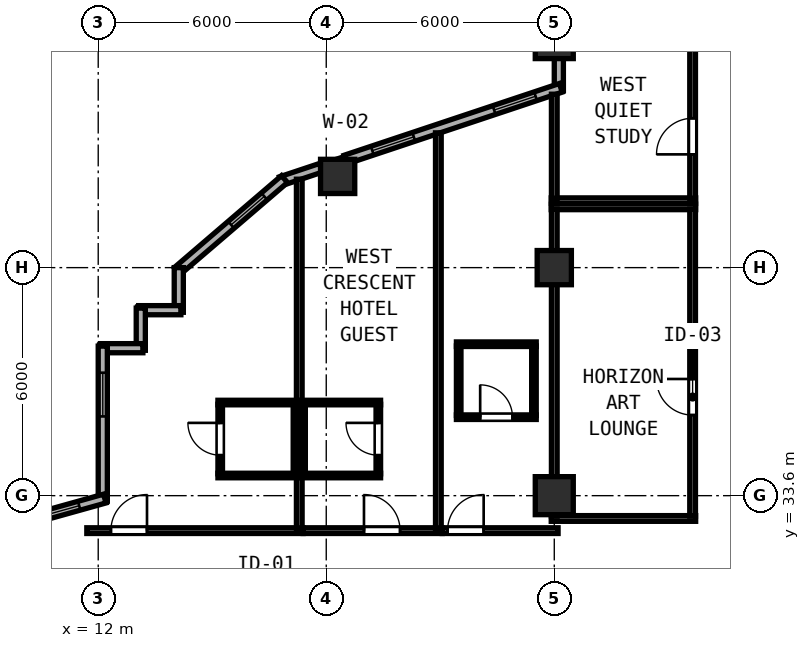
"""IFC4 building model, lengths in metres.
Left out: names, types, materials, properties, quantities, classifications, styles, units other than length and angle.
Written with IfcOpenShell. Run it as: python <this file> out.ifc"""

import sys

from ifc_helpers import new_model, si_unit, direction, frame, frame_2d, origin, origin_2d, place, context, subcontext, project, spatial, rectangle, hollow_rectangle, extrude, element, fill, save


model = new_model("IFC4")
c1 = context("Model", 3, precision=1e-05, world=origin(), true_north=direction((0.0, 1.0)))
c2 = subcontext(c1, "Body", "Model", "MODEL_VIEW")
j1 = project(units=[si_unit("LENGTHUNIT", "METRE"), si_unit("PLANEANGLEUNIT", "RADIAN")], contexts=[c1])
p1 = place(None, origin())
s1 = spatial("IfcSite", under=j1, at=p1, CompositionType="ELEMENT")
p2 = place(p1, origin())
s2 = spatial("IfcBuilding", under=s1, at=p2, CompositionType="ELEMENT")
p3 = place(p2, frame((0.0, 0.0, 144.8)))
s3 = spatial("IfcBuildingStorey", under=s2, at=p3, CompositionType="ELEMENT", Elevation=144.8)
for number, where, z_axis, x_axis in (
    (1, (24.0, 33.6, 0.0), (0.0, 0.0, 1.0), (1.0, 0.0, 0.0)),
    (2, (24.0, 45.6, 0.0), (0.0, 0.0, 1.0), (1.0, 0.0, 0.0)),
):
    element("IfcColumn", number, at=place(p3, frame(where, z_axis=z_axis, x_axis=x_axis)), inside=s3, PredefinedType="COLUMN", context=c2, shape_type="SweptSolid", body=[
        extrude(hollow_rectangle(XDim=1.0, YDim=1.0, WallThickness=0.038, at=origin_2d()), origin(), (0.0, 0.0, 1.0), 3.8),
    ])
for number, where, z_axis, x_axis in (
    (3, (24.0, 39.6, 0.0), (0.0, 0.0, 1.0), (1.0, 0.0, 0.0)),
    (4, (18.3, 42.0, 0.0), (0.0, 0.0, 1.0), (1.0, 0.0, 0.0)),
):
    element("IfcColumn", number, at=place(p3, frame(where, z_axis=z_axis, x_axis=x_axis)), inside=s3, PredefinedType="COLUMN", context=c2, shape_type="SweptSolid", body=[
        extrude(hollow_rectangle(XDim=0.9, YDim=0.9, WallThickness=0.034, at=origin_2d()), origin(), (0.0, 0.0, 1.0), 3.8),
    ])
p4 = place(p3, frame((24.12, 45.108, 0.0), z_axis=(0.0, 0.0, 1.0), x_axis=(0.0, -1.0, 0.0)))
e5 = element("IfcWall", 5, at=p4, inside=s3, PredefinedType="SOLIDWALL", context=c2, shape_type="SweptSolid", body=[
    extrude(rectangle(XDim=0.849, YDim=0.24, at=frame_2d((0.425, 0.0))), origin(), (0.0, 0.0, 1.0), 3.145),
])
p5 = place(p3, frame((24.172, 44.331, 0.0), z_axis=(0.0, 0.0, 1.0), x_axis=(-0.948683298051, -0.316227766017, 0.0)))
e6 = element("IfcWall", 6, at=p5, inside=s3, PredefinedType="SOLIDWALL", context=c2, shape_type="SweptSolid", body=[
    extrude(rectangle(XDim=5.973, YDim=0.24, at=frame_2d((2.987, 0.0))), origin(), (0.0, 0.0, 1.0), 3.145),
])
p6 = place(p5, frame((0.7, 0.0, 0.85)))
e7 = element("IfcOpeningElement", 7, at=p6, cuts=e6, PredefinedType="OPENING", context=c2, shape_type="SweptSolid", body=[
    extrude(rectangle(XDim=1.15, YDim=1.8, at=frame_2d((0.575, 0.9))), frame((0.0, 0.13, 0.0), z_axis=(0.0, -1.0, 0.0), x_axis=(1.0, 0.0, 0.0)), (0.0, 0.0, 1.0), 0.26),
])
p7 = place(p5, frame((4.078, 0.0, 0.85)))
e8 = element("IfcOpeningElement", 8, at=p7, cuts=e6, PredefinedType="OPENING", context=c2, shape_type="SweptSolid", body=[
    extrude(rectangle(XDim=1.15, YDim=1.8, at=frame_2d((0.575, 0.9))), frame((0.0, 0.13, 0.0), z_axis=(0.0, -1.0, 0.0), x_axis=(1.0, 0.0, 0.0)), (0.0, 0.0, 1.0), 0.26),
])
p8 = place(p3, frame((17.858, 42.226, 0.0), z_axis=(0.0, 0.0, 1.0), x_axis=(-0.948639166064, -0.316360131194, 0.0)))
e9 = element("IfcWall", 9, at=p8, inside=s3, PredefinedType="SOLIDWALL", context=c2, shape_type="SweptSolid", body=[
    extrude(rectangle(XDim=1.107, YDim=0.24, at=frame_2d((0.553, 0.0))), origin(), (0.0, 0.0, 1.0), 3.6),
])
p9 = place(p3, frame((16.902, 41.929, 0.0), z_axis=(0.0, 0.0, 1.0), x_axis=(-0.759275136126, -0.650769750112, 0.0)))
e10 = element("IfcWall", 10, at=p9, inside=s3, PredefinedType="SOLIDWALL", context=c2, shape_type="SweptSolid", body=[
    extrude(rectangle(XDim=3.719, YDim=0.24, at=frame_2d((1.86, 0.0))), origin(), (0.0, 0.0, 1.0), 3.6),
])
p10 = place(p9, frame((0.7, 0.0, 0.85)))
e11 = element("IfcOpeningElement", 11, at=p10, cuts=e10, PredefinedType="OPENING", context=c2, shape_type="SweptSolid", body=[
    extrude(rectangle(XDim=1.15, YDim=1.8, at=frame_2d((0.575, 0.9))), frame((0.0, 0.13, 0.0), z_axis=(0.0, -1.0, 0.0), x_axis=(1.0, 0.0, 0.0)), (0.0, 0.0, 1.0), 0.26),
])
p11 = place(p3, frame((14.12, 39.6, 0.0), z_axis=(0.0, 0.0, 1.0), x_axis=(0.0, -1.0, 0.0)))
e12 = element("IfcWall", 12, at=p11, inside=s3, PredefinedType="SOLIDWALL", context=c2, shape_type="SweptSolid", body=[
    extrude(rectangle(XDim=1.175, YDim=0.24, at=frame_2d((0.587, 0.0))), origin(), (0.0, 0.0, 1.0), 3.6),
])
p12 = place(p3, frame((14.175, 38.48, 0.0), z_axis=(0.0, 0.0, 1.0), x_axis=(-1.0, 0.0, 0.0)))
e13 = element("IfcWall", 13, at=p12, inside=s3, PredefinedType="SOLIDWALL", context=c2, shape_type="SweptSolid", body=[
    extrude(rectangle(XDim=1.11, YDim=0.24, at=frame_2d((0.555, 0.0))), origin(), (0.0, 0.0, 1.0), 3.6),
])
p13 = place(p3, frame((13.12, 38.535, 0.0), z_axis=(0.0, 0.0, 1.0), x_axis=(0.0, -1.0, 0.0)))
e14 = element("IfcWall", 14, at=p13, inside=s3, PredefinedType="SOLIDWALL", context=c2, shape_type="SweptSolid", body=[
    extrude(rectangle(XDim=1.11, YDim=0.24, at=frame_2d((0.555, 0.0))), origin(), (0.0, 0.0, 1.0), 3.6),
])
p14 = place(p3, frame((13.175, 37.48, 0.0), z_axis=(0.0, 0.0, 1.0), x_axis=(-1.0, 0.0, 0.0)))
e15 = element("IfcWall", 15, at=p14, inside=s3, PredefinedType="SOLIDWALL", context=c2, shape_type="SweptSolid", body=[
    extrude(rectangle(XDim=1.11, YDim=0.24, at=frame_2d((0.555, 0.0))), origin(), (0.0, 0.0, 1.0), 3.6),
])
p15 = place(p3, frame((12.12, 37.535, 0.0), z_axis=(0.0, 0.0, 1.0), x_axis=(0.0, -1.0, 0.0)))
e16 = element("IfcWall", 16, at=p15, inside=s3, PredefinedType="SOLIDWALL", context=c2, shape_type="SweptSolid", body=[
    extrude(rectangle(XDim=4.081, YDim=0.24, at=frame_2d((2.041, 0.0))), origin(), (0.0, 0.0, 1.0), 3.6),
])
p16 = place(p15, frame((0.7, 0.0, 0.85)))
e17 = element("IfcOpeningElement", 17, at=p16, cuts=e16, PredefinedType="OPENING", context=c2, shape_type="SweptSolid", body=[
    extrude(rectangle(XDim=1.15, YDim=1.8, at=frame_2d((0.575, 0.9))), frame((0.0, 0.13, 0.0), z_axis=(0.0, -1.0, 0.0), x_axis=(1.0, 0.0, 0.0)), (0.0, 0.0, 1.0), 0.26),
])
p17 = place(p3, frame((12.173, 33.524, 0.0), z_axis=(0.0, 0.0, 1.0), x_axis=(-0.963197271032, -0.268795493036, 0.0)))
e18 = element("IfcWall", 18, at=p17, inside=s3, PredefinedType="SOLIDWALL", context=c2, shape_type="SweptSolid", body=[
    extrude(rectangle(XDim=9.095, YDim=0.24, at=frame_2d((4.548, 0.0))), origin(), (0.0, 0.0, 1.0), 3.6),
])
p18 = place(p17, frame((0.7, 0.0, 0.85)))
e19 = element("IfcOpeningElement", 19, at=p18, cuts=e18, PredefinedType="OPENING", context=c2, shape_type="SweptSolid", body=[
    extrude(rectangle(XDim=1.15, YDim=1.8, at=frame_2d((0.575, 0.9))), frame((0.0, 0.13, 0.0), z_axis=(0.0, -1.0, 0.0), x_axis=(1.0, 0.0, 0.0)), (0.0, 0.0, 1.0), 0.26),
])
p19 = place(p17, frame((6.1, 0.0, 0.85)))
e20 = element("IfcOpeningElement", 20, at=p19, cuts=e18, PredefinedType="OPENING", context=c2, shape_type="SweptSolid", body=[
    extrude(rectangle(XDim=1.15, YDim=1.8, at=frame_2d((0.575, 0.9))), frame((0.0, 0.13, 0.0), z_axis=(0.0, -1.0, 0.0), x_axis=(1.0, 0.0, 0.0)), (0.0, 0.0, 1.0), 0.26),
])
for number, where, z_axis, x_axis in (
    (21, (23.92, 41.2, 0.0), (0.0, 0.0, 1.0), (1.0, 0.0, 0.0)),
    (22, (23.92, 33.0, 0.0), (0.0, 0.0, 1.0), (1.0, 0.0, 0.0)),
):
    element("IfcWall", number, at=place(p3, frame(where, z_axis=z_axis, x_axis=x_axis)), inside=s3, PredefinedType="PARTITIONING", context=c2, shape_type="SweptSolid", body=[
        extrude(rectangle(XDim=3.8, YDim=0.15, at=frame_2d((1.9, 0.0))), origin(), (0.0, 0.0, 1.0), 3.6),
    ])
p20 = place(p3, frame((24.0, 33.06, 0.0), z_axis=(0.0, 0.0, 1.0), x_axis=(0.0, 1.0, 0.0)))
e23 = element("IfcWall", 23, at=p20, inside=s3, PredefinedType="PARTITIONING", context=c2, shape_type="SweptSolid", body=[
    extrude(rectangle(XDim=8.08, YDim=0.15, at=frame_2d((4.04, 0.0))), origin(), (0.0, 0.0, 1.0), 3.145),
])
p21 = place(p3, frame((27.64, 33.06, 0.0), z_axis=(0.0, 0.0, 1.0), x_axis=(0.0, 1.0, 0.0)))
e24 = element("IfcWall", 24, at=p21, inside=s3, PredefinedType="PARTITIONING", context=c2, shape_type="SweptSolid", body=[
    extrude(rectangle(XDim=8.08, YDim=0.15, at=frame_2d((4.04, 0.0))), origin(), (0.0, 0.0, 1.0), 3.6),
])
p22 = place(p21, frame((3.61, 0.0, 0.0), z_axis=(0.0, 0.0, 1.0), x_axis=(-1.0, 0.0, 0.0)))
e25 = element("IfcOpeningElement", 25, at=p22, cuts=e24, PredefinedType="OPENING", context=c2, shape_type="SweptSolid", body=[
    extrude(rectangle(XDim=0.95, YDim=2.12, at=frame_2d((0.475, 1.06))), frame((0.0, 0.085, 0.0), z_axis=(0.0, -1.0, 0.0), x_axis=(1.0, 0.0, 0.0)), (0.0, 0.0, 1.0), 0.17),
])
p23 = place(p3, frame((23.92, 41.36, 0.0), z_axis=(0.0, 0.0, 1.0), x_axis=(1.0, 0.0, 0.0)))
e26 = element("IfcWall", 26, at=p23, inside=s3, PredefinedType="PARTITIONING", context=c2, shape_type="SweptSolid", body=[
    extrude(rectangle(XDim=3.8, YDim=0.15, at=frame_2d((1.9, 0.0))), origin(), (0.0, 0.0, 1.0), 3.6),
])
p24 = place(p3, frame((24.0, 41.42, 0.0), z_axis=(0.0, 0.0, 1.0), x_axis=(0.0, 1.0, 0.0)))
e27 = element("IfcWall", 27, at=p24, inside=s3, PredefinedType="PARTITIONING", context=c2, shape_type="SweptSolid", body=[
    extrude(rectangle(XDim=2.743, YDim=0.15, at=frame_2d((1.372, 0.0))), origin(), (0.0, 0.0, 1.0), 3.145),
])
p25 = place(p3, frame((27.64, 41.42, 0.0), z_axis=(0.0, 0.0, 1.0), x_axis=(0.0, 1.0, 0.0)))
e28 = element("IfcWall", 28, at=p25, inside=s3, PredefinedType="PARTITIONING", context=c2, shape_type="SweptSolid", body=[
    extrude(rectangle(XDim=4.54, YDim=0.15, at=frame_2d((2.27, 0.0))), origin(), (0.0, 0.0, 1.0), 3.6),
])
p26 = place(p25, frame((2.11, 0.0, 0.0), z_axis=(0.0, 0.0, 1.0), x_axis=(-1.0, 0.0, 0.0)))
e29 = element("IfcOpeningElement", 29, at=p26, cuts=e28, PredefinedType="OPENING", context=c2, shape_type="SweptSolid", body=[
    extrude(rectangle(XDim=0.95, YDim=2.12, at=frame_2d((0.475, 1.06))), frame((0.0, 0.085, 0.0), z_axis=(0.0, -1.0, 0.0), x_axis=(1.0, 0.0, 0.0)), (0.0, 0.0, 1.0), 0.17),
])
p27 = place(p3, frame((11.7, 32.68, 0.0), z_axis=(0.0, 0.0, 1.0), x_axis=(1.0, 0.0, 0.0)))
e30 = element("IfcWall", 30, at=p27, inside=s3, PredefinedType="PARTITIONING", context=c2, shape_type="SweptSolid", body=[
    extrude(rectangle(XDim=5.69, YDim=0.15, at=frame_2d((2.845, 0.0))), origin(), (0.0, 0.0, 1.0), 3.6),
])
p28 = place(p27, frame((0.634, 0.0, 0.0)))
e31 = element("IfcOpeningElement", 31, at=p28, cuts=e30, PredefinedType="OPENING", context=c2, shape_type="SweptSolid", body=[
    extrude(rectangle(XDim=0.95, YDim=2.15, at=frame_2d((0.475, 1.075))), frame((0.0, 0.085, 0.0), z_axis=(0.0, -1.0, 0.0), x_axis=(1.0, 0.0, 0.0)), (0.0, 0.0, 1.0), 0.17),
])
p29 = place(p3, frame((17.29, 32.74, 0.0), z_axis=(0.0, 0.0, 1.0), x_axis=(0.0, 1.0, 0.0)))
e32 = element("IfcWall", 32, at=p29, inside=s3, PredefinedType="PARTITIONING", context=c2, shape_type="SweptSolid", body=[
    extrude(rectangle(XDim=9.186, YDim=0.15, at=frame_2d((4.593, 0.0))), origin(), (0.0, 0.0, 1.0), 3.6),
])
for number, where, z_axis, x_axis in (
    (33, (15.15, 36.05, 0.0), (0.0, 0.0, 1.0), (1.0, 0.0, 0.0)),
    (34, (15.15, 34.13, 0.0), (0.0, 0.0, 1.0), (1.0, 0.0, 0.0)),
):
    element("IfcWall", number, at=place(p3, frame(where, z_axis=z_axis, x_axis=x_axis)), inside=s3, PredefinedType="PARTITIONING", context=c2, shape_type="SweptSolid", body=[
        extrude(rectangle(XDim=2.08, YDim=0.12, at=frame_2d((1.04, 0.0))), origin(), (0.0, 0.0, 1.0), 3.6),
    ])
p30 = place(p3, frame((15.21, 34.175, 0.0), z_axis=(0.0, 0.0, 1.0), x_axis=(0.0, 1.0, 0.0)))
e35 = element("IfcWall", 35, at=p30, inside=s3, PredefinedType="PARTITIONING", context=c2, shape_type="SweptSolid", body=[
    extrude(rectangle(XDim=1.83, YDim=0.12, at=frame_2d((0.915, 0.0))), origin(), (0.0, 0.0, 1.0), 3.6),
])
p31 = place(p30, frame((1.34, 0.0, 0.0), z_axis=(0.0, 0.0, 1.0), x_axis=(-1.0, 0.0, 0.0)))
e36 = element("IfcOpeningElement", 36, at=p31, cuts=e35, PredefinedType="OPENING", context=c2, shape_type="SweptSolid", body=[
    extrude(rectangle(XDim=0.85, YDim=2.1, at=frame_2d((0.425, 1.05))), frame((0.0, 0.07, 0.0), z_axis=(0.0, -1.0, 0.0), x_axis=(1.0, 0.0, 0.0)), (0.0, 0.0, 1.0), 0.14),
])
p32 = place(p3, frame((17.19, 34.175, 0.0), z_axis=(0.0, 0.0, 1.0), x_axis=(0.0, 1.0, 0.0)))
e37 = element("IfcWall", 37, at=p32, inside=s3, PredefinedType="PARTITIONING", context=c2, shape_type="SweptSolid", body=[
    extrude(rectangle(XDim=1.83, YDim=0.12, at=frame_2d((0.915, 0.0))), origin(), (0.0, 0.0, 1.0), 3.6),
])
p33 = place(p3, frame((17.392, 32.68, 0.0), z_axis=(0.0, 0.0, 1.0), x_axis=(1.0, 0.0, 0.0)))
e38 = element("IfcWall", 38, at=p33, inside=s3, PredefinedType="PARTITIONING", context=c2, shape_type="SweptSolid", body=[
    extrude(rectangle(XDim=3.658, YDim=0.15, at=frame_2d((1.829, 0.0))), origin(), (0.0, 0.0, 1.0), 3.6),
])
p34 = place(p33, frame((1.601, 0.0, 0.0)))
e39 = element("IfcOpeningElement", 39, at=p34, cuts=e38, PredefinedType="OPENING", context=c2, shape_type="SweptSolid", body=[
    extrude(rectangle(XDim=0.95, YDim=2.15, at=frame_2d((0.475, 1.075))), frame((0.0, 0.085, 0.0), z_axis=(0.0, -1.0, 0.0), x_axis=(1.0, 0.0, 0.0)), (0.0, 0.0, 1.0), 0.17),
])
p35 = place(p3, frame((20.95, 32.74, 0.0), z_axis=(0.0, 0.0, 1.0), x_axis=(0.0, 1.0, 0.0)))
e40 = element("IfcWall", 40, at=p35, inside=s3, PredefinedType="PARTITIONING", context=c2, shape_type="SweptSolid", body=[
    extrude(rectangle(XDim=10.406, YDim=0.15, at=frame_2d((5.203, 0.0))), origin(), (0.0, 0.0, 1.0), 3.6),
])
for number, where, z_axis, x_axis in (
    (41, (17.35, 36.05, 0.0), (0.0, 0.0, 1.0), (1.0, 0.0, 0.0)),
    (42, (17.35, 34.13, 0.0), (0.0, 0.0, 1.0), (1.0, 0.0, 0.0)),
):
    element("IfcWall", number, at=place(p3, frame(where, z_axis=z_axis, x_axis=x_axis)), inside=s3, PredefinedType="PARTITIONING", context=c2, shape_type="SweptSolid", body=[
        extrude(rectangle(XDim=2.08, YDim=0.12, at=frame_2d((1.04, 0.0))), origin(), (0.0, 0.0, 1.0), 3.6),
    ])
p36 = place(p3, frame((17.39, 34.175, 0.0), z_axis=(0.0, 0.0, 1.0), x_axis=(0.0, 1.0, 0.0)))
e43 = element("IfcWall", 43, at=p36, inside=s3, PredefinedType="PARTITIONING", context=c2, shape_type="SweptSolid", body=[
    extrude(rectangle(XDim=1.83, YDim=0.12, at=frame_2d((0.915, 0.0))), origin(), (0.0, 0.0, 1.0), 3.6),
])
p37 = place(p3, frame((19.37, 34.175, 0.0), z_axis=(0.0, 0.0, 1.0), x_axis=(0.0, 1.0, 0.0)))
e44 = element("IfcWall", 44, at=p37, inside=s3, PredefinedType="PARTITIONING", context=c2, shape_type="SweptSolid", body=[
    extrude(rectangle(XDim=1.83, YDim=0.12, at=frame_2d((0.915, 0.0))), origin(), (0.0, 0.0, 1.0), 3.6),
])
p38 = place(p37, frame((0.49, 0.0, 0.0)))
e45 = element("IfcOpeningElement", 45, at=p38, cuts=e44, PredefinedType="OPENING", context=c2, shape_type="SweptSolid", body=[
    extrude(rectangle(XDim=0.85, YDim=2.1, at=frame_2d((0.425, 1.05))), frame((0.0, 0.07, 0.0), z_axis=(0.0, -1.0, 0.0), x_axis=(1.0, 0.0, 0.0)), (0.0, 0.0, 1.0), 0.14),
])
p39 = place(p3, frame((21.052, 32.68, 0.0), z_axis=(0.0, 0.0, 1.0), x_axis=(1.0, 0.0, 0.0)))
e46 = element("IfcWall", 46, at=p39, inside=s3, PredefinedType="PARTITIONING", context=c2, shape_type="SweptSolid", body=[
    extrude(rectangle(XDim=3.048, YDim=0.15, at=frame_2d((1.524, 0.0))), origin(), (0.0, 0.0, 1.0), 3.6),
])
p40 = place(p39, frame((0.14, 0.0, 0.0)))
e47 = element("IfcOpeningElement", 47, at=p40, cuts=e46, PredefinedType="OPENING", context=c2, shape_type="SweptSolid", body=[
    extrude(rectangle(XDim=0.95, YDim=2.15, at=frame_2d((0.475, 1.075))), frame((0.0, 0.085, 0.0), z_axis=(0.0, -1.0, 0.0), x_axis=(1.0, 0.0, 0.0)), (0.0, 0.0, 1.0), 0.17),
])
p41 = place(p3, frame((21.425, 37.585, 0.0), z_axis=(0.0, 0.0, 1.0), x_axis=(1.0, 0.0, 0.0)))
e48 = element("IfcWall", 48, at=p41, inside=s3, PredefinedType="PARTITIONING", context=c2, shape_type="SweptSolid", body=[
    extrude(rectangle(XDim=2.1, YDim=0.12, at=frame_2d((1.05, 0.0))), origin(), (0.0, 0.0, 1.0), 3.6),
])
p42 = place(p3, frame((21.425, 35.665, 0.0), z_axis=(0.0, 0.0, 1.0), x_axis=(1.0, 0.0, 0.0)))
e49 = element("IfcWall", 49, at=p42, inside=s3, PredefinedType="PARTITIONING", context=c2, shape_type="SweptSolid", body=[
    extrude(rectangle(XDim=2.1, YDim=0.12, at=frame_2d((1.05, 0.0))), origin(), (0.0, 0.0, 1.0), 3.6),
])
p43 = place(p42, frame((0.625, 0.0, 0.0)))
e50 = element("IfcOpeningElement", 50, at=p43, cuts=e49, PredefinedType="OPENING", context=c2, shape_type="SweptSolid", body=[
    extrude(rectangle(XDim=0.85, YDim=2.1, at=frame_2d((0.425, 1.05))), frame((0.0, 0.07, 0.0), z_axis=(0.0, -1.0, 0.0), x_axis=(1.0, 0.0, 0.0)), (0.0, 0.0, 1.0), 0.14),
])
for number, where, z_axis, x_axis in (
    (51, (21.485, 35.71, 0.0), (0.0, 0.0, 1.0), (0.0, 1.0, 0.0)),
    (52, (23.465, 35.71, 0.0), (0.0, 0.0, 1.0), (0.0, 1.0, 0.0)),
):
    element("IfcWall", number, at=place(p3, frame(where, z_axis=z_axis, x_axis=x_axis)), inside=s3, PredefinedType="PARTITIONING", context=c2, shape_type="SweptSolid", body=[
        extrude(rectangle(XDim=1.83, YDim=0.12, at=frame_2d((0.915, 0.0))), origin(), (0.0, 0.0, 1.0), 3.6),
    ])
p44 = place(p6, origin())
e53 = element("IfcWindow", 53, at=p44, inside=s3, PartitioningType="SINGLE_PANEL", PredefinedType="WINDOW", context=c2, shape_type="SweptSolid", body=[
    extrude(rectangle(XDim=1.15, YDim=1.8, at=frame_2d((0.575, 0.9))), frame((0.0, 0.03, 0.0), z_axis=(0.0, -1.0, 0.0), x_axis=(1.0, 0.0, 0.0)), (0.0, 0.0, 1.0), 0.06),
])
fill(e7, e53)
p45 = place(p10, origin())
e54 = element("IfcWindow", 54, at=p45, inside=s3, PartitioningType="SINGLE_PANEL", PredefinedType="WINDOW", context=c2, shape_type="SweptSolid", body=[
    extrude(rectangle(XDim=1.15, YDim=1.8, at=frame_2d((0.575, 0.9))), frame((0.0, 0.03, 0.0), z_axis=(0.0, -1.0, 0.0), x_axis=(1.0, 0.0, 0.0)), (0.0, 0.0, 1.0), 0.06),
])
fill(e11, e54)
p46 = place(p16, origin())
e55 = element("IfcWindow", 55, at=p46, inside=s3, PartitioningType="SINGLE_PANEL", PredefinedType="WINDOW", context=c2, shape_type="SweptSolid", body=[
    extrude(rectangle(XDim=1.15, YDim=1.8, at=frame_2d((0.575, 0.9))), frame((0.0, 0.03, 0.0), z_axis=(0.0, -1.0, 0.0), x_axis=(1.0, 0.0, 0.0)), (0.0, 0.0, 1.0), 0.06),
])
fill(e17, e55)
p47 = place(p18, origin())
e56 = element("IfcWindow", 56, at=p47, inside=s3, PartitioningType="SINGLE_PANEL", PredefinedType="WINDOW", context=c2, shape_type="SweptSolid", body=[
    extrude(rectangle(XDim=1.15, YDim=1.8, at=frame_2d((0.575, 0.9))), frame((0.0, 0.03, 0.0), z_axis=(0.0, -1.0, 0.0), x_axis=(1.0, 0.0, 0.0)), (0.0, 0.0, 1.0), 0.06),
])
fill(e19, e56)
p48 = place(p22, origin())
e57 = element("IfcDoor", 57, at=p48, inside=s3, OperationType="SINGLE_SWING_LEFT", PredefinedType="DOOR", context=c2, shape_type="SweptSolid", body=[
    extrude(rectangle(XDim=0.95, YDim=2.12, at=frame_2d((0.475, 1.06))), frame((0.0, 0.025, 0.0), z_axis=(0.0, -1.0, 0.0), x_axis=(1.0, 0.0, 0.0)), (0.0, 0.0, 1.0), 0.05),
])
fill(e25, e57)
p49 = place(p26, origin())
e58 = element("IfcDoor", 58, at=p49, inside=s3, OperationType="SINGLE_SWING_RIGHT", PredefinedType="DOOR", context=c2, shape_type="SweptSolid", body=[
    extrude(rectangle(XDim=0.95, YDim=2.12, at=frame_2d((0.475, 1.06))), frame((0.0, 0.025, 0.0), z_axis=(0.0, -1.0, 0.0), x_axis=(1.0, 0.0, 0.0)), (0.0, 0.0, 1.0), 0.05),
])
fill(e29, e58)
p50 = place(p28, origin())
e59 = element("IfcDoor", 59, at=p50, inside=s3, OperationType="SINGLE_SWING_RIGHT", PredefinedType="DOOR", context=c2, shape_type="SweptSolid", body=[
    extrude(rectangle(XDim=0.95, YDim=2.15, at=frame_2d((0.475, 1.075))), frame((0.0, 0.025, 0.0), z_axis=(0.0, -1.0, 0.0), x_axis=(1.0, 0.0, 0.0)), (0.0, 0.0, 1.0), 0.05),
])
fill(e31, e59)
p51 = place(p31, origin())
e60 = element("IfcDoor", 60, at=p51, inside=s3, OperationType="SINGLE_SWING_LEFT", PredefinedType="DOOR", context=c2, shape_type="SweptSolid", body=[
    extrude(rectangle(XDim=0.85, YDim=2.1, at=frame_2d((0.425, 1.05))), frame((0.0, 0.025, 0.0), z_axis=(0.0, -1.0, 0.0), x_axis=(1.0, 0.0, 0.0)), (0.0, 0.0, 1.0), 0.05),
])
fill(e36, e60)
p52 = place(p34, origin())
e61 = element("IfcDoor", 61, at=p52, inside=s3, OperationType="SINGLE_SWING_LEFT", PredefinedType="DOOR", context=c2, shape_type="SweptSolid", body=[
    extrude(rectangle(XDim=0.95, YDim=2.15, at=frame_2d((0.475, 1.075))), frame((0.0, 0.025, 0.0), z_axis=(0.0, -1.0, 0.0), x_axis=(1.0, 0.0, 0.0)), (0.0, 0.0, 1.0), 0.05),
])
fill(e39, e61)
p53 = place(p38, origin())
e62 = element("IfcDoor", 62, at=p53, inside=s3, OperationType="SINGLE_SWING_RIGHT", PredefinedType="DOOR", context=c2, shape_type="SweptSolid", body=[
    extrude(rectangle(XDim=0.85, YDim=2.1, at=frame_2d((0.425, 1.05))), frame((0.0, 0.025, 0.0), z_axis=(0.0, -1.0, 0.0), x_axis=(1.0, 0.0, 0.0)), (0.0, 0.0, 1.0), 0.05),
])
fill(e45, e62)
p54 = place(p40, origin())
e63 = element("IfcDoor", 63, at=p54, inside=s3, OperationType="SINGLE_SWING_RIGHT", PredefinedType="DOOR", context=c2, shape_type="SweptSolid", body=[
    extrude(rectangle(XDim=0.95, YDim=2.15, at=frame_2d((0.475, 1.075))), frame((0.0, 0.025, 0.0), z_axis=(0.0, -1.0, 0.0), x_axis=(1.0, 0.0, 0.0)), (0.0, 0.0, 1.0), 0.05),
])
fill(e47, e63)
p55 = place(p43, origin())
e64 = element("IfcDoor", 64, at=p55, inside=s3, OperationType="SINGLE_SWING_LEFT", PredefinedType="DOOR", context=c2, shape_type="SweptSolid", body=[
    extrude(rectangle(XDim=0.85, YDim=2.1, at=frame_2d((0.425, 1.05))), frame((0.0, 0.025, 0.0), z_axis=(0.0, -1.0, 0.0), x_axis=(1.0, 0.0, 0.0)), (0.0, 0.0, 1.0), 0.05),
])
fill(e50, e64)
p56 = place(p7, origin())
e65 = element("IfcWindow", 65, at=p56, inside=s3, PartitioningType="SINGLE_PANEL", PredefinedType="WINDOW", context=c2, shape_type="SweptSolid", body=[
    extrude(rectangle(XDim=1.15, YDim=1.8, at=frame_2d((0.575, 0.9))), frame((0.0, 0.03, 0.0), z_axis=(0.0, -1.0, 0.0), x_axis=(1.0, 0.0, 0.0)), (0.0, 0.0, 1.0), 0.06),
])
fill(e8, e65)
save(model, sys.argv[1])
